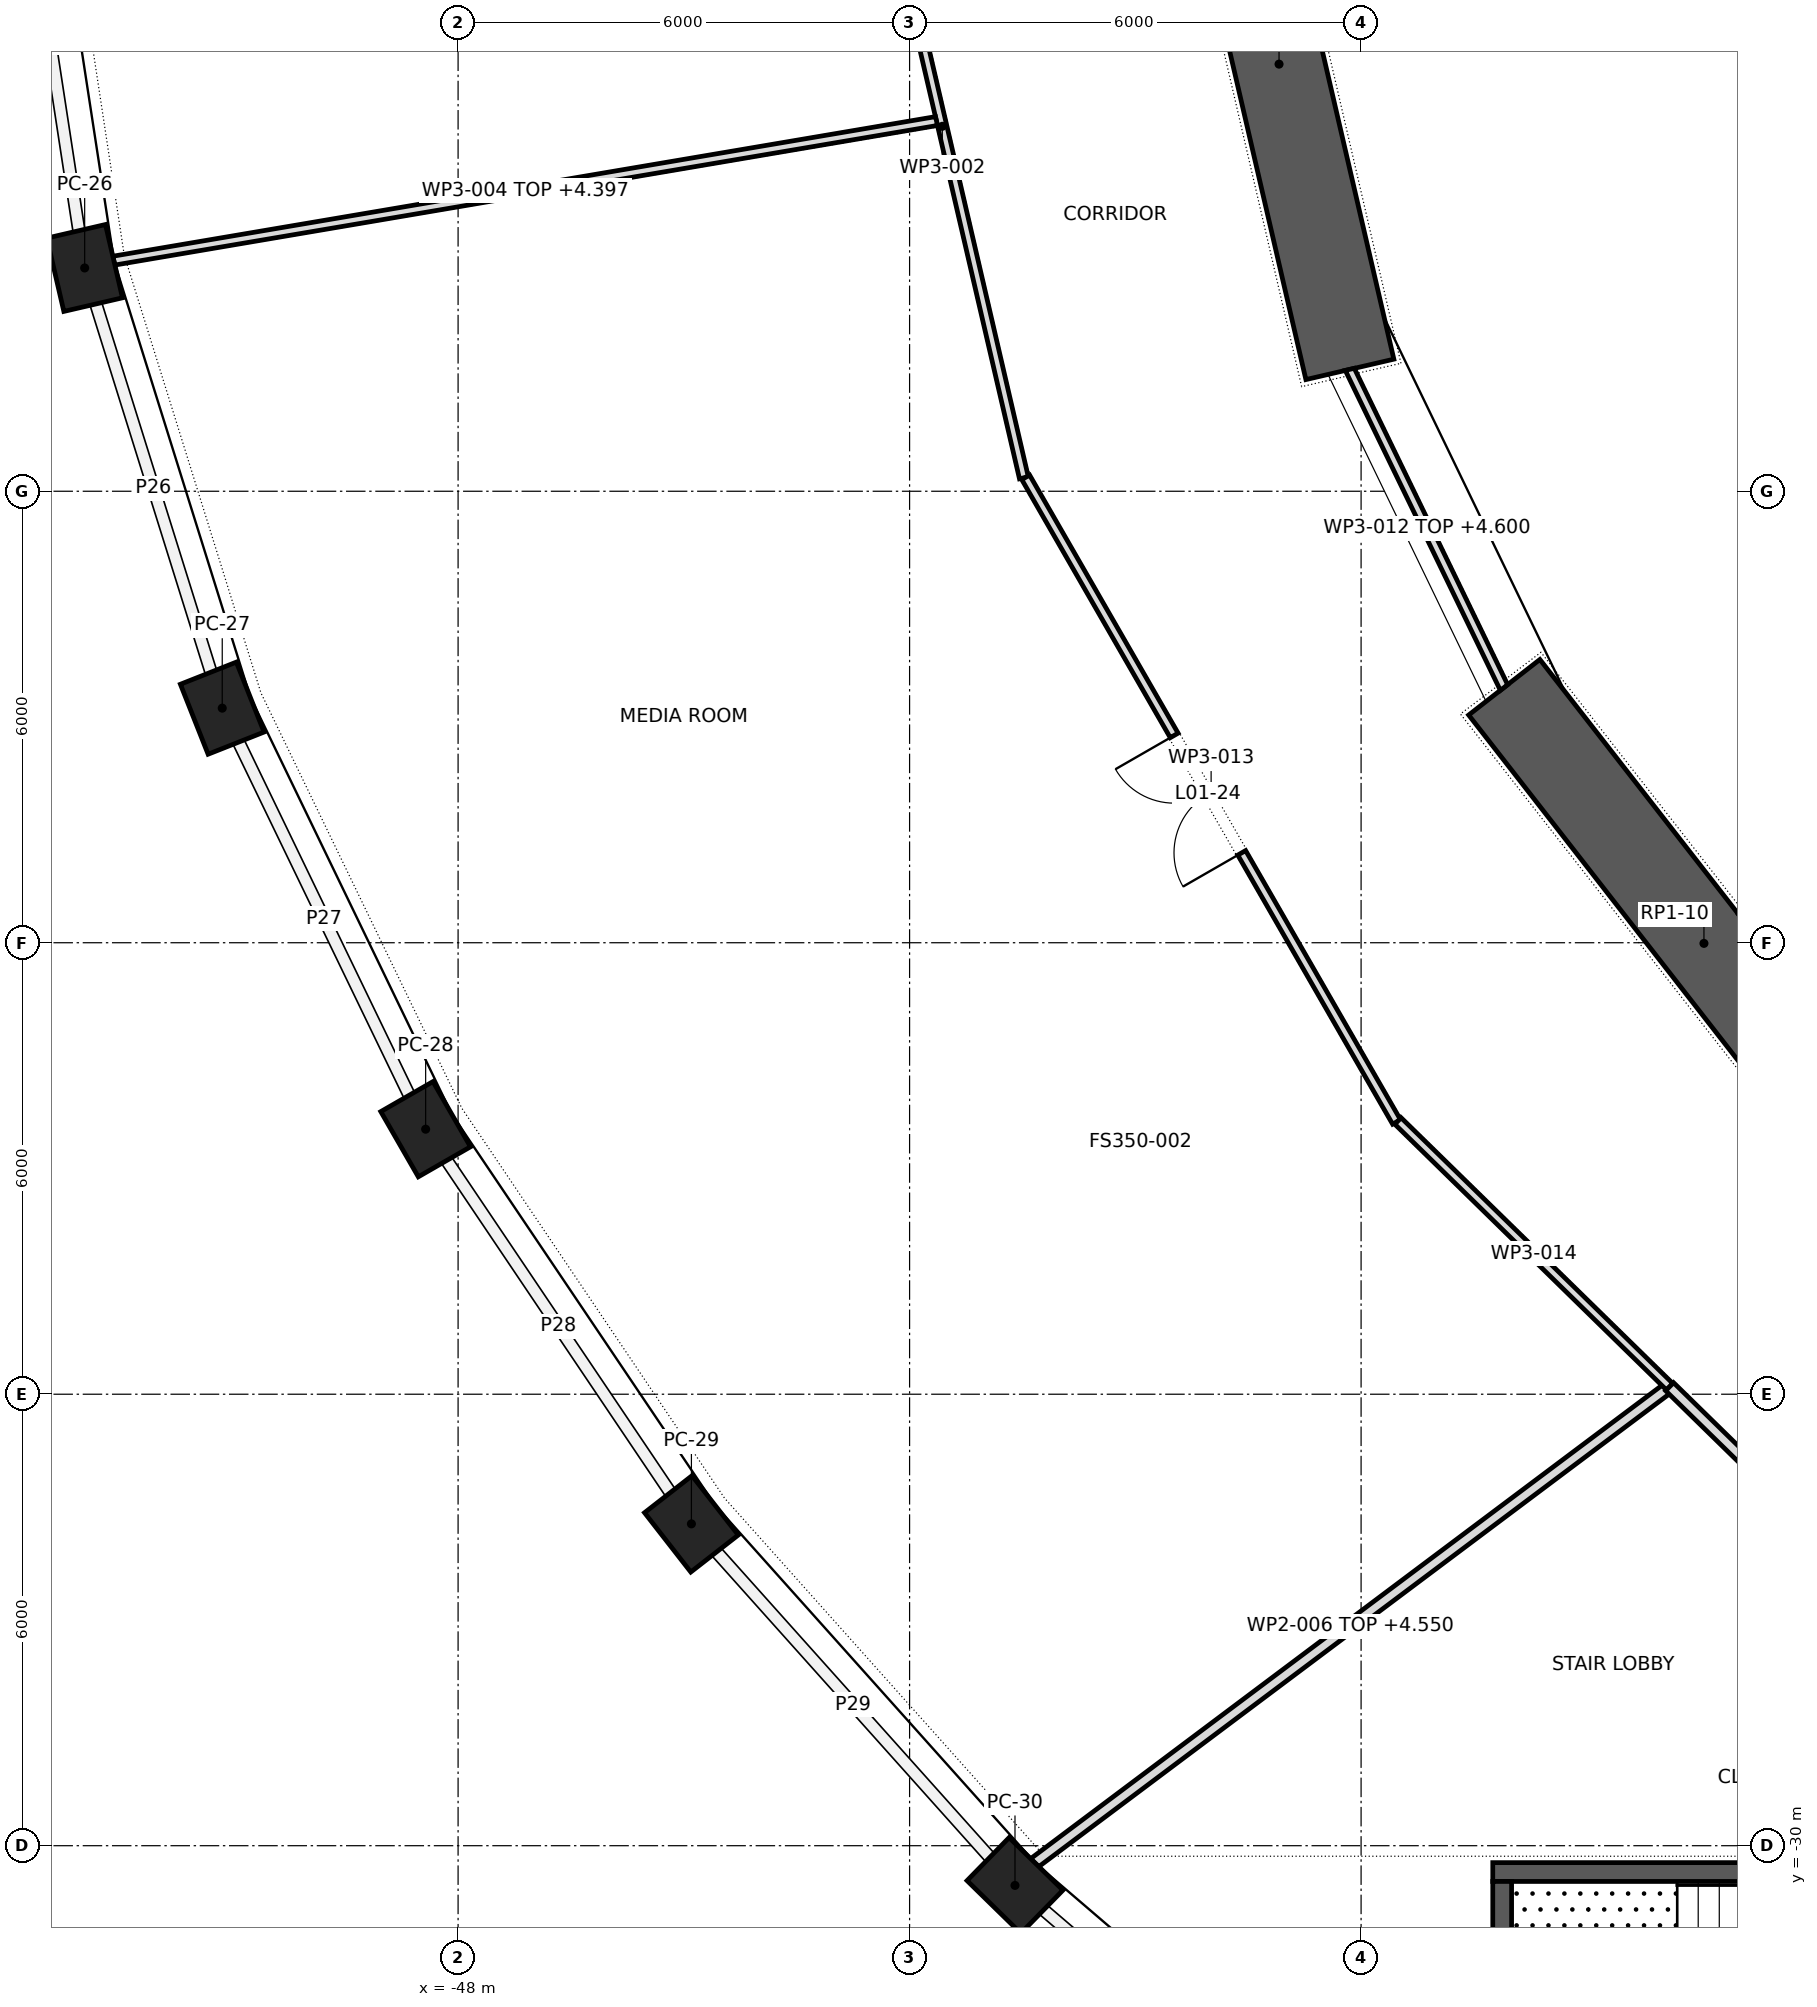
"""IFC4 building model, lengths in metres.
Left out: names, types, materials, properties, quantities, classifications, styles, units other than length and angle.
Written with IfcOpenShell. Run it as: python <this file> out.ifc"""

import sys

from ifc_helpers import new_model, si_unit, direction, frame, frame_2d, origin, origin_2d, place, context, subcontext, project, spatial, polyline, rectangle, outline, extrude, element, fill, save


model = new_model("IFC4")
c1 = context("Model", 3, precision=1e-05, world=origin(), true_north=direction((0.0, 1.0)))
c2 = subcontext(c1, "Body", "Model", "MODEL_VIEW")
j1 = project(units=[si_unit("LENGTHUNIT", "METRE"), si_unit("PLANEANGLEUNIT", "RADIAN")], contexts=[c1])
p1 = place(None, origin())
s1 = spatial("IfcSite", under=j1, at=p1, CompositionType="ELEMENT")
p2 = place(p1, origin())
s2 = spatial("IfcBuilding", under=s1, at=p2, CompositionType="ELEMENT")
p3 = place(p2, frame((0.0, 0.0, 7.0)))
s3 = spatial("IfcBuildingStorey", under=s2, at=p3, CompositionType="ELEMENT", Elevation=7.0)
for number, where, z_axis, x_axis in (
    (1, (-52.962, -9.033, 0.0), (0.0, 0.0, 1.0), (0.226, -0.974, 0.0)),
    (2, (-51.134, -14.883, 0.0), (0.0, 0.0, 1.0), (0.368, -0.93, 0.0)),
    (3, (-48.431, -20.478, 0.0), (0.0, 0.0, 1.0), (0.499, -0.867, 0.0)),
    (4, (-44.899, -25.723, 0.0), (0.0, 0.0, 1.0), (0.615, -0.789, 0.0)),
    (5, (-40.599, -30.528, 0.0), (0.0, 0.0, 1.0), (0.715, -0.699, 0.0)),
):
    element("IfcColumn", number, at=place(p3, frame(where, z_axis=z_axis, x_axis=x_axis)), inside=s3, PredefinedType="COLUMN", context=c2, shape_type="SweptSolid", body=[
        extrude(rectangle(XDim=1.0, YDim=0.8, at=origin_2d()), origin(), (0.0, 0.0, 1.0), 5.5),
    ])
p4 = place(p3, frame((-38.032, -2.267, 0.0), z_axis=(0.0, 0.0, 1.0), x_axis=(0.226058185805, -0.974113800657, 0.0)))
e6 = element("IfcWall", 6, at=p4, inside=s3, PredefinedType="SHEAR", context=c2, shape_type="SweptSolid", body=[
    extrude(rectangle(XDim=8.329, YDim=1.2, at=frame_2d((4.165, 0.0))), origin(), (0.0, 0.0, 1.0), 5.5),
])
p5 = place(p3, frame((-34.097, -14.605, 0.0), z_axis=(0.0, 0.0, 1.0), x_axis=(0.614825322247, -0.788663314174, 0.0)))
e7 = element("IfcWall", 7, at=p5, inside=s3, PredefinedType="SHEAR", context=c2, shape_type="SweptSolid", body=[
    extrude(rectangle(XDim=8.632, YDim=1.2, at=frame_2d((4.316, 0.0))), origin(), (0.0, 0.0, 1.0), 5.5),
])
p6 = place(p3, frame((-34.25, -30.35, 0.0), z_axis=(0.0, 0.0, 1.0), x_axis=(1.0, 0.0, 0.0)))
e8 = element("IfcWall", 8, at=p6, inside=s3, PredefinedType="SHEAR", context=c2, shape_type="SweptSolid", body=[
    extrude(rectangle(XDim=8.5, YDim=0.25, at=frame_2d((4.25, 0.0))), origin(), (0.0, 0.0, 1.0), 5.15),
])
p7 = place(p3, frame((-34.125, -33.525, 0.0), z_axis=(0.0, 0.0, 1.0), x_axis=(0.0, 1.0, 0.0)))
e9 = element("IfcWall", 9, at=p7, inside=s3, PredefinedType="SHEAR", context=c2, shape_type="SweptSolid", body=[
    extrude(rectangle(XDim=3.05, YDim=0.25, at=frame_2d((1.525, 0.0))), origin(), (0.0, 0.0, 1.0), 5.15),
])
p8 = place(p3, frame((-42.649, -2.479, 0.0), z_axis=(0.0, 0.0, 1.0), x_axis=(0.226065872809, -0.974112016737, 0.0)))
e10 = element("IfcWall", 10, at=p8, inside=s3, PredefinedType="PARTITIONING", context=c2, shape_type="SweptSolid", body=[
    extrude(rectangle(XDim=9.591, YDim=0.12, at=frame_2d((4.795, 0.0))), origin(), (0.0, 0.0, 1.0), 5.15),
])
p9 = place(p3, frame((-41.642, -7.081, 0.0), z_axis=(0.0, 0.0, 1.0), x_axis=(-0.985913154621, -0.167258038803, 0.0)))
e11 = element("IfcWall", 11, at=p9, inside=s3, PredefinedType="PARTITIONING", context=c2, shape_type="SweptSolid", body=[
    extrude(outline(polyline([(0.004, -0.06), (11.093, -0.06), (11.085, 0.06), (-0.004, 0.06), (0.004, -0.06)])), origin(), (0.0, 0.0, 1.0), 4.397),
])
p10 = place(p3, frame((-40.337, -30.226, 0.0), z_axis=(0.0, 0.0, 1.0), x_axis=(0.800114543622, 0.599847244792, 0.0)))
e12 = element("IfcWall", 12, at=p10, inside=s3, PredefinedType="PARTITIONING", context=c2, shape_type="SweptSolid", body=[
    extrude(outline(polyline([(0.011, -0.075), (10.485, -0.075), (10.485, 0.075), (-0.011, 0.075), (0.011, -0.075)])), origin(), (0.0, 0.0, 1.0), 4.55),
])
p11 = place(p3, frame((-36.15, -10.38, 0.0), z_axis=(0.0, 0.0, 1.0), x_axis=(0.436102687495, -0.899896908518, 0.0)))
e13 = element("IfcWall", 13, at=p11, inside=s3, PredefinedType="PARTITIONING", context=c2, shape_type="SweptSolid", body=[
    extrude(outline(polyline([(-0.014, -0.06), (4.712, -0.06), (4.686, 0.06), (0.014, 0.06), (-0.014, -0.06)])), origin(), (0.0, 0.0, 1.0), 4.6),
])
p12 = place(p3, frame((-35.529, -20.381, 0.0), z_axis=(0.0, 0.0, 1.0), x_axis=(-0.498637746392, 0.866810474021, 0.0)))
e14 = element("IfcWall", 14, at=p12, inside=s3, PredefinedType="PARTITIONING", context=c2, shape_type="SweptSolid", body=[
    extrude(rectangle(XDim=9.882, YDim=0.12, at=frame_2d((4.941, 0.0))), origin(), (0.0, 0.0, 1.0), 5.15),
])
p13 = place(p12, frame((4.125, 0.0, 0.0)))
e15 = element("IfcOpeningElement", 15, at=p13, cuts=e14, PredefinedType="OPENING", context=c2, shape_type="SweptSolid", body=[
    extrude(rectangle(XDim=1.8, YDim=2.1, at=frame_2d((0.9, 1.05))), frame((0.0, 0.072, 0.0), z_axis=(0.0, -1.0, 0.0), x_axis=(1.0, 0.0, 0.0)), (0.0, 0.0, 1.0), 0.144),
])
p14 = place(p3, frame((-35.51, -20.369, 0.0), z_axis=(0.0, 0.0, 1.0), x_axis=(0.714847158957, -0.699280729987, 0.0)))
e16 = element("IfcWall", 16, at=p14, inside=s3, PredefinedType="PARTITIONING", context=c2, shape_type="SweptSolid", body=[
    extrude(rectangle(XDim=5.05, YDim=0.12, at=frame_2d((2.525, 0.0))), origin(), (0.0, 0.0, 1.0), 5.15),
])
p15 = place(p3, frame((-31.9, -23.9, 0.0), z_axis=(0.0, 0.0, 1.0), x_axis=(0.714809256367, -0.699319474212, 0.0)))
e17 = element("IfcWall", 17, at=p15, inside=s3, PredefinedType="PARTITIONING", context=c2, shape_type="SweptSolid", body=[
    extrude(rectangle(XDim=5.249, YDim=0.15, at=frame_2d((2.624, 0.0))), origin(), (0.0, 0.0, 1.0), 5.15),
])
p16 = place(p13, origin())
e18 = element("IfcDoor", 18, at=p16, inside=s3, OperationType="DOUBLE_DOOR_SINGLE_SWING", PredefinedType="DOOR", context=c2, shape_type="SweptSolid", body=[
    extrude(rectangle(XDim=1.8, YDim=2.1, at=frame_2d((0.9, 1.05))), frame((0.0, 0.025, 0.0), z_axis=(0.0, -1.0, 0.0), x_axis=(1.0, 0.0, 0.0)), (0.0, 0.0, 1.0), 0.05),
])
fill(e15, e18)
save(model, sys.argv[1])
